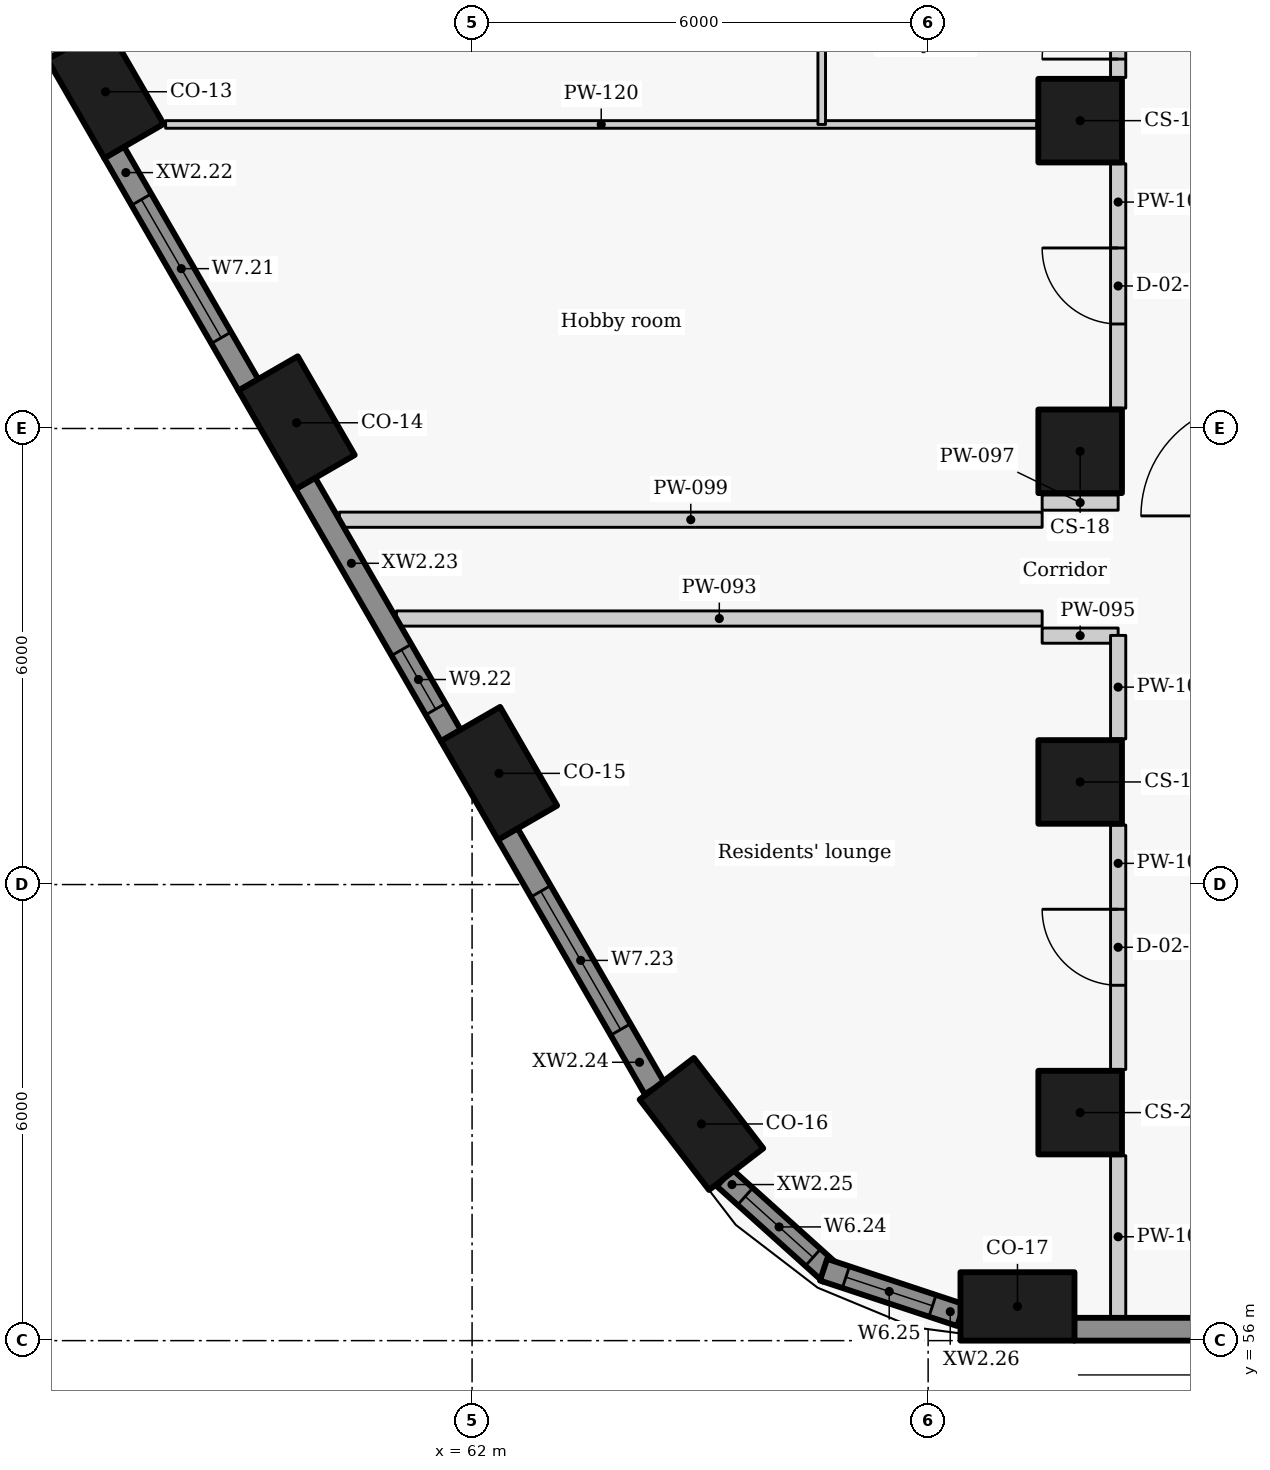
"""IFC4 building model, lengths in metres.
Left out: names, types, materials, properties, quantities, classifications, styles, units other than length and angle.
Written with IfcOpenShell. Run it as: python <this file> out.ifc"""

import sys

from ifc_helpers import new_model, si_unit, direction, frame, frame_2d, origin, origin_2d, place, context, subcontext, project, spatial, rectangle, extrude, element, fill, save


model = new_model("IFC4")
c1 = context("Model", 3, precision=1e-05, world=origin(), true_north=direction((0.0, 1.0)))
c2 = subcontext(c1, "Body", "Model", "MODEL_VIEW")
j1 = project(units=[si_unit("LENGTHUNIT", "METRE"), si_unit("PLANEANGLEUNIT", "RADIAN")], contexts=[c1])
p1 = place(None, origin())
s1 = spatial("IfcSite", under=j1, at=p1, CompositionType="ELEMENT")
p2 = place(p1, origin())
s2 = spatial("IfcBuilding", under=s1, at=p2, CompositionType="ELEMENT")
p3 = place(p2, frame((0.0, 0.0, 41.4)))
s3 = spatial("IfcBuildingStorey", under=s2, at=p3, CompositionType="ELEMENT", Elevation=41.4)
p4 = place(p3, frame((57.177, 72.43, -0.275), z_axis=(0.0, 0.0, 1.0), x_axis=(0.5, -0.866025403784, 0.0)))
e1 = element("IfcColumn", 1, at=p4, inside=s3, PredefinedType="COLUMN", context=c2, shape_type="SweptSolid", body=[
    extrude(rectangle(XDim=1.5, YDim=0.9, at=origin_2d()), origin(), (0.0, 0.0, 1.0), 3.575),
])
for number, where, z_axis, x_axis in (
    (2, (59.692, 68.075, 0.0), (0.0, 0.0, 1.0), (0.5, -0.866, 0.0)),
    (3, (62.354, 63.463, 0.0), (0.0, 0.0, 1.0), (0.5, -0.866, 0.0)),
    (4, (65.018, 58.851, 0.0), (0.0, 0.0, 1.0), (0.609, -0.793, 0.0)),
    (5, (69.175, 56.45, 0.0), (0.0, 0.0, 1.0), (1.0, 0.0, 0.0)),
):
    element("IfcColumn", number, at=place(p3, frame(where, z_axis=z_axis, x_axis=x_axis)), inside=s3, PredefinedType="COLUMN", context=c2, shape_type="SweptSolid", body=[
        extrude(rectangle(XDim=1.5, YDim=0.9, at=origin_2d()), origin(), (0.0, 0.0, 1.0), 3.3),
    ])
for number, where, z_axis, x_axis in (
    (6, (70.0, 72.05, 0.0), (0.0, 0.0, 1.0), (0.0, -1.0, 0.0)),
    (7, (70.0, 67.7, 0.0), (0.0, 0.0, 1.0), (0.0, -1.0, 0.0)),
    (8, (70.0, 63.35, 0.0), (0.0, 0.0, 1.0), (0.0, -1.0, 0.0)),
    (9, (70.0, 59.0, 0.0), (0.0, 0.0, 1.0), (0.0, -1.0, 0.0)),
):
    element("IfcColumn", number, at=place(p3, frame(where, z_axis=z_axis, x_axis=x_axis)), inside=s3, PredefinedType="COLUMN", context=c2, shape_type="SweptSolid", body=[
        extrude(rectangle(XDim=1.1, YDim=1.1, at=origin_2d()), origin(), (0.0, 0.0, 1.0), 3.3),
    ])
p5 = place(p3, frame((53.814, 77.847, 0.0), z_axis=(0.0, 0.0, 1.0), x_axis=(0.492363204642, -0.870389840655, 0.0)))
e10 = element("IfcWall", 10, at=p5, inside=s3, PredefinedType="SOLIDWALL", context=c2, shape_type="SweptSolid", body=[
    extrude(rectangle(XDim=5.626, YDim=0.3, at=frame_2d((2.813, 0.0))), origin(), (0.0, 0.0, 1.0), 2.425),
])
p6 = place(p5, frame((1.081, 0.0, 0.9)))
e11 = element("IfcOpeningElement", 11, at=p6, cuts=e10, PredefinedType="OPENING", context=c2, shape_type="SweptSolid", body=[
    extrude(rectangle(XDim=1.5, YDim=1.1, at=frame_2d((0.75, 0.55))), frame((0.0, 0.16, 0.0), z_axis=(0.0, -1.0, 0.0), x_axis=(1.0, 0.0, 0.0)), (0.0, 0.0, 1.0), 0.32),
])
p7 = place(p5, frame((3.606, 0.0, 0.9)))
e12 = element("IfcOpeningElement", 12, at=p7, cuts=e10, PredefinedType="OPENING", context=c2, shape_type="SweptSolid", body=[
    extrude(rectangle(XDim=1.5, YDim=1.1, at=frame_2d((0.75, 0.55))), frame((0.0, 0.16, 0.0), z_axis=(0.0, -1.0, 0.0), x_axis=(1.0, 0.0, 0.0)), (0.0, 0.0, 1.0), 0.32),
])
p8 = place(p3, frame((57.29, 71.634, 0.0), z_axis=(0.0, 0.0, 1.0), x_axis=(0.499977402622, -0.866038449993, 0.0)))
e13 = element("IfcWall", 13, at=p8, inside=s3, PredefinedType="SOLIDWALL", context=c2, shape_type="SweptSolid", body=[
    extrude(rectangle(XDim=3.537, YDim=0.3, at=frame_2d((1.769, 0.0))), origin(), (0.0, 0.0, 1.0), 2.425),
])
p9 = place(p8, frame((0.719, 0.0, 0.9)))
e14 = element("IfcOpeningElement", 14, at=p9, cuts=e13, PredefinedType="OPENING", context=c2, shape_type="SweptSolid", body=[
    extrude(rectangle(XDim=2.1, YDim=1.1, at=frame_2d((1.05, 0.55))), frame((0.0, 0.16, 0.0), z_axis=(0.0, -1.0, 0.0), x_axis=(1.0, 0.0, 0.0)), (0.0, 0.0, 1.0), 0.32),
])
p10 = place(p3, frame((59.805, 67.279, 0.0), z_axis=(0.0, 0.0, 1.0), x_axis=(0.500001735503, -0.866024401789, 0.0)))
e15 = element("IfcWall", 15, at=p10, inside=s3, PredefinedType="SOLIDWALL", context=c2, shape_type="SweptSolid", body=[
    extrude(rectangle(XDim=3.834, YDim=0.3, at=frame_2d((1.917, 0.0))), origin(), (0.0, 0.0, 1.0), 2.425),
])
p11 = place(p10, frame((2.531, 0.0, 0.9)))
e16 = element("IfcOpeningElement", 16, at=p11, cuts=e15, PredefinedType="OPENING", context=c2, shape_type="SweptSolid", body=[
    extrude(rectangle(XDim=0.9, YDim=1.1, at=frame_2d((0.45, 0.55))), frame((0.0, 0.16, 0.0), z_axis=(0.0, -1.0, 0.0), x_axis=(1.0, 0.0, 0.0)), (0.0, 0.0, 1.0), 0.32),
])
p12 = place(p3, frame((62.468, 62.667, 0.0), z_axis=(0.0, 0.0, 1.0), x_axis=(0.499948341072, -0.866055227026, 0.0)))
e17 = element("IfcWall", 17, at=p12, inside=s3, PredefinedType="SOLIDWALL", context=c2, shape_type="SweptSolid", body=[
    extrude(rectangle(XDim=3.867, YDim=0.3, at=frame_2d((1.934, 0.0))), origin(), (0.0, 0.0, 1.0), 2.425),
])
p13 = place(p12, frame((0.872, 0.0, 0.9)))
e18 = element("IfcOpeningElement", 18, at=p13, cuts=e17, PredefinedType="OPENING", context=c2, shape_type="SweptSolid", body=[
    extrude(rectangle(XDim=2.1, YDim=1.1, at=frame_2d((1.05, 0.55))), frame((0.0, 0.16, 0.0), z_axis=(0.0, -1.0, 0.0), x_axis=(1.0, 0.0, 0.0)), (0.0, 0.0, 1.0), 0.32),
])
p14 = place(p3, frame((65.32, 58.143, 0.0), z_axis=(0.0, 0.0, 1.0), x_axis=(0.7435526378, -0.668677407141, 0.0)))
e19 = element("IfcWall", 19, at=p14, inside=s3, PredefinedType="SOLIDWALL", context=c2, shape_type="SweptSolid", body=[
    extrude(rectangle(XDim=1.878, YDim=0.3, at=frame_2d((0.939, 0.0))), origin(), (0.0, 0.0, 1.0), 2.425),
])
p15 = place(p14, frame((0.367, 0.0, 0.9)))
e20 = element("IfcOpeningElement", 20, at=p15, cuts=e19, PredefinedType="OPENING", context=c2, shape_type="SweptSolid", body=[
    extrude(rectangle(XDim=1.2, YDim=1.1, at=frame_2d((0.6, 0.55))), frame((0.0, 0.16, 0.0), z_axis=(0.0, -1.0, 0.0), x_axis=(1.0, 0.0, 0.0)), (0.0, 0.0, 1.0), 0.32),
])
p16 = place(p3, frame((66.624, 56.933, 0.0), z_axis=(0.0, 0.0, 1.0), x_axis=(0.949246659442, -0.314532636683, 0.0)))
e21 = element("IfcWall", 21, at=p16, inside=s3, PredefinedType="SOLIDWALL", context=c2, shape_type="SweptSolid", body=[
    extrude(rectangle(XDim=1.902, YDim=0.3, at=frame_2d((0.951, 0.0))), origin(), (0.0, 0.0, 1.0), 2.425),
])
p17 = place(p16, frame((0.31, 0.0, 0.9)))
e22 = element("IfcOpeningElement", 22, at=p17, cuts=e21, PredefinedType="OPENING", context=c2, shape_type="SweptSolid", body=[
    extrude(rectangle(XDim=1.2, YDim=1.1, at=frame_2d((0.6, 0.55))), frame((0.0, 0.16, 0.0), z_axis=(0.0, -1.0, 0.0), x_axis=(1.0, 0.0, 0.0)), (0.0, 0.0, 1.0), 0.32),
])
p18 = place(p3, frame((69.921, 56.15, 0.0), z_axis=(0.0, 0.0, 1.0), x_axis=(1.0, 0.0, 0.0)))
e23 = element("IfcWall", 23, at=p18, inside=s3, PredefinedType="SOLIDWALL", context=c2, shape_type="SweptSolid", body=[
    extrude(rectangle(XDim=19.84, YDim=0.3, at=frame_2d((9.92, 0.0))), origin(), (0.0, 0.0, 1.0), 2.425),
])
p19 = place(p3, frame((61.005, 65.5, 0.0), z_axis=(0.0, 0.0, 1.0), x_axis=(1.0, 0.0, 0.0)))
e24 = element("IfcWall", 24, at=p19, inside=s3, PredefinedType="PARTITIONING", context=c2, shape_type="SweptSolid", body=[
    extrude(rectangle(XDim=8.495, YDim=0.2, at=frame_2d((4.248, 0.0))), origin(), (0.0, 0.0, 1.0), 2.405),
])
for number, where, z_axis, x_axis in (
    (25, (69.5, 65.275, 0.0), (0.0, 0.0, 1.0), (1.0, 0.0, 0.0)),
    (26, (69.5, 67.025, 0.0), (0.0, 0.0, 1.0), (1.0, 0.0, 0.0)),
):
    element("IfcWall", number, at=place(p3, frame(where, z_axis=z_axis, x_axis=x_axis)), inside=s3, PredefinedType="PARTITIONING", context=c2, shape_type="SweptSolid", body=[
        extrude(rectangle(XDim=1.0, YDim=0.2, at=frame_2d((0.5, 0.0))), origin(), (0.0, 0.0, 1.0), 2.505),
    ])
p20 = place(p3, frame((60.255, 66.8, 0.0), z_axis=(0.0, 0.0, 1.0), x_axis=(1.0, 0.0, 0.0)))
e27 = element("IfcWall", 27, at=p20, inside=s3, PredefinedType="PARTITIONING", context=c2, shape_type="SweptSolid", body=[
    extrude(rectangle(XDim=9.245, YDim=0.2, at=frame_2d((4.623, 0.0))), origin(), (0.0, 0.0, 1.0), 2.405),
])
p21 = place(p3, frame((70.5, 56.3, 0.0), z_axis=(0.0, 0.0, 1.0), x_axis=(0.0, 1.0, 0.0)))
e28 = element("IfcWall", 28, at=p21, inside=s3, PredefinedType="PARTITIONING", context=c2, shape_type="SweptSolid", body=[
    extrude(rectangle(XDim=2.133, YDim=0.2, at=frame_2d((1.066, 0.0))), origin(), (0.0, 0.0, 1.0), 3.025),
])
p22 = place(p3, frame((70.5, 59.567, 0.0), z_axis=(0.0, 0.0, 1.0), x_axis=(0.0, 1.0, 0.0)))
e29 = element("IfcWall", 29, at=p22, inside=s3, PredefinedType="PARTITIONING", context=c2, shape_type="SweptSolid", body=[
    extrude(rectangle(XDim=3.216, YDim=0.2, at=frame_2d((1.608, 0.0))), origin(), (0.0, 0.0, 1.0), 3.025),
])
p23 = place(p22, frame((1.108, 0.0, 0.0)))
e30 = element("IfcOpeningElement", 30, at=p23, cuts=e29, PredefinedType="OPENING", context=c2, shape_type="SweptSolid", body=[
    extrude(rectangle(XDim=1.0, YDim=2.1, at=frame_2d((0.5, 1.05))), frame((0.0, 0.11, 0.0), z_axis=(0.0, -1.0, 0.0), x_axis=(1.0, 0.0, 0.0)), (0.0, 0.0, 1.0), 0.22),
])
p24 = place(p3, frame((70.5, 63.917, 0.0), z_axis=(0.0, 0.0, 1.0), x_axis=(0.0, 1.0, 0.0)))
e31 = element("IfcWall", 31, at=p24, inside=s3, PredefinedType="PARTITIONING", context=c2, shape_type="SweptSolid", body=[
    extrude(rectangle(XDim=1.361, YDim=0.2, at=frame_2d((0.681, 0.0))), origin(), (0.0, 0.0, 1.0), 3.025),
])
p25 = place(p3, frame((70.5, 68.267, 0.0), z_axis=(0.0, 0.0, 1.0), x_axis=(0.0, 1.0, 0.0)))
e32 = element("IfcWall", 32, at=p25, inside=s3, PredefinedType="PARTITIONING", context=c2, shape_type="SweptSolid", body=[
    extrude(rectangle(XDim=3.216, YDim=0.2, at=frame_2d((1.608, 0.0))), origin(), (0.0, 0.0, 1.0), 3.025),
])
p26 = place(p25, frame((1.108, 0.0, 0.0)))
e33 = element("IfcOpeningElement", 33, at=p26, cuts=e32, PredefinedType="OPENING", context=c2, shape_type="SweptSolid", body=[
    extrude(rectangle(XDim=1.0, YDim=2.1, at=frame_2d((0.5, 1.05))), frame((0.0, 0.11, 0.0), z_axis=(0.0, -1.0, 0.0), x_axis=(1.0, 0.0, 0.0)), (0.0, 0.0, 1.0), 0.22),
])
p27 = place(p3, frame((70.5, 72.617, 0.0), z_axis=(0.0, 0.0, 1.0), x_axis=(0.0, 1.0, 0.0)))
e34 = element("IfcWall", 34, at=p27, inside=s3, PredefinedType="PARTITIONING", context=c2, shape_type="SweptSolid", body=[
    extrude(rectangle(XDim=4.166, YDim=0.2, at=frame_2d((2.083, 0.0))), origin(), (0.0, 0.0, 1.0), 3.025),
])
p28 = place(p27, frame((0.243, 0.0, 0.0)))
e35 = element("IfcOpeningElement", 35, at=p28, cuts=e34, PredefinedType="OPENING", context=c2, shape_type="SweptSolid", body=[
    extrude(rectangle(XDim=1.0, YDim=2.1, at=frame_2d((0.5, 1.05))), frame((0.0, 0.11, 0.0), z_axis=(0.0, -1.0, 0.0), x_axis=(1.0, 0.0, 0.0)), (0.0, 0.0, 1.0), 0.22),
])
p29 = place(p3, frame((57.968, 72.0, 0.0), z_axis=(0.0, 0.0, 1.0), x_axis=(1.0, 0.0, 0.0)))
e36 = element("IfcWall", 36, at=p29, inside=s3, PredefinedType="PARTITIONING", context=c2, shape_type="SweptSolid", body=[
    extrude(rectangle(XDim=11.462, YDim=0.1, at=frame_2d((5.731, 0.0))), origin(), (0.0, 0.0, 1.0), 3.025),
])
p30 = place(p3, frame((66.6, 72.0, 0.0), z_axis=(0.0, 0.0, 1.0), x_axis=(0.0, 1.0, 0.0)))
e37 = element("IfcWall", 37, at=p30, inside=s3, PredefinedType="PARTITIONING", context=c2, shape_type="SweptSolid", body=[
    extrude(rectangle(XDim=21.9, YDim=0.1, at=frame_2d((10.95, 0.0))), origin(), (0.0, 0.0, 1.0), 3.025),
])
p31 = place(p30, frame((1.161, 0.0, 0.0)))
e38 = element("IfcOpeningElement", 38, at=p31, cuts=e37, PredefinedType="OPENING", context=c2, shape_type="SweptSolid", body=[
    extrude(rectangle(XDim=0.9, YDim=2.1, at=frame_2d((0.45, 1.05))), frame((0.0, 0.06, 0.0), z_axis=(0.0, -1.0, 0.0), x_axis=(1.0, 0.0, 0.0)), (0.0, 0.0, 1.0), 0.12),
])
p32 = place(p30, frame((4.384, 0.0, 0.0)))
e39 = element("IfcOpeningElement", 39, at=p32, cuts=e37, PredefinedType="OPENING", context=c2, shape_type="SweptSolid", body=[
    extrude(rectangle(XDim=0.9, YDim=2.1, at=frame_2d((0.45, 1.05))), frame((0.0, 0.06, 0.0), z_axis=(0.0, -1.0, 0.0), x_axis=(1.0, 0.0, 0.0)), (0.0, 0.0, 1.0), 0.12),
])
p33 = place(p30, frame((8.323, 0.0, 0.0)))
e40 = element("IfcOpeningElement", 40, at=p33, cuts=e37, PredefinedType="OPENING", context=c2, shape_type="SweptSolid", body=[
    extrude(rectangle(XDim=0.9, YDim=2.1, at=frame_2d((0.45, 1.05))), frame((0.0, 0.06, 0.0), z_axis=(0.0, -1.0, 0.0), x_axis=(1.0, 0.0, 0.0)), (0.0, 0.0, 1.0), 0.12),
])
p34 = place(p30, frame((12.218, 0.0, 0.0)))
e41 = element("IfcOpeningElement", 41, at=p34, cuts=e37, PredefinedType="OPENING", context=c2, shape_type="SweptSolid", body=[
    extrude(rectangle(XDim=0.9, YDim=2.1, at=frame_2d((0.45, 1.05))), frame((0.0, 0.06, 0.0), z_axis=(0.0, -1.0, 0.0), x_axis=(1.0, 0.0, 0.0)), (0.0, 0.0, 1.0), 0.12),
])
p35 = place(p30, frame((15.353, 0.0, 0.0)))
e42 = element("IfcOpeningElement", 42, at=p35, cuts=e37, PredefinedType="OPENING", context=c2, shape_type="SweptSolid", body=[
    extrude(rectangle(XDim=0.9, YDim=2.1, at=frame_2d((0.45, 1.05))), frame((0.0, 0.06, 0.0), z_axis=(0.0, -1.0, 0.0), x_axis=(1.0, 0.0, 0.0)), (0.0, 0.0, 1.0), 0.12),
])
p36 = place(p30, frame((19.186, 0.0, 0.0)))
e43 = element("IfcOpeningElement", 43, at=p36, cuts=e37, PredefinedType="OPENING", context=c2, shape_type="SweptSolid", body=[
    extrude(rectangle(XDim=0.9, YDim=2.1, at=frame_2d((0.45, 1.05))), frame((0.0, 0.06, 0.0), z_axis=(0.0, -1.0, 0.0), x_axis=(1.0, 0.0, 0.0)), (0.0, 0.0, 1.0), 0.12),
])
p37 = place(p9, origin())
e44 = element("IfcWindow", 44, at=p37, inside=s3, PartitioningType="SINGLE_PANEL", PredefinedType="WINDOW", context=c2, shape_type="SweptSolid", body=[
    extrude(rectangle(XDim=2.1, YDim=1.1, at=frame_2d((1.05, 0.55))), frame((0.0, 0.03, 0.0), z_axis=(0.0, -1.0, 0.0), x_axis=(1.0, 0.0, 0.0)), (0.0, 0.0, 1.0), 0.06),
])
fill(e14, e44)
p38 = place(p11, origin())
e45 = element("IfcWindow", 45, at=p38, inside=s3, PartitioningType="SINGLE_PANEL", PredefinedType="WINDOW", context=c2, shape_type="SweptSolid", body=[
    extrude(rectangle(XDim=0.9, YDim=1.1, at=frame_2d((0.45, 0.55))), frame((0.0, 0.03, 0.0), z_axis=(0.0, -1.0, 0.0), x_axis=(1.0, 0.0, 0.0)), (0.0, 0.0, 1.0), 0.06),
])
fill(e16, e45)
p39 = place(p13, origin())
e46 = element("IfcWindow", 46, at=p39, inside=s3, PartitioningType="SINGLE_PANEL", PredefinedType="WINDOW", context=c2, shape_type="SweptSolid", body=[
    extrude(rectangle(XDim=2.1, YDim=1.1, at=frame_2d((1.05, 0.55))), frame((0.0, 0.03, 0.0), z_axis=(0.0, -1.0, 0.0), x_axis=(1.0, 0.0, 0.0)), (0.0, 0.0, 1.0), 0.06),
])
fill(e18, e46)
p40 = place(p15, origin())
e47 = element("IfcWindow", 47, at=p40, inside=s3, PartitioningType="SINGLE_PANEL", PredefinedType="WINDOW", context=c2, shape_type="SweptSolid", body=[
    extrude(rectangle(XDim=1.2, YDim=1.1, at=frame_2d((0.6, 0.55))), frame((0.0, 0.03, 0.0), z_axis=(0.0, -1.0, 0.0), x_axis=(1.0, 0.0, 0.0)), (0.0, 0.0, 1.0), 0.06),
])
fill(e20, e47)
p41 = place(p17, origin())
e48 = element("IfcWindow", 48, at=p41, inside=s3, PartitioningType="SINGLE_PANEL", PredefinedType="WINDOW", context=c2, shape_type="SweptSolid", body=[
    extrude(rectangle(XDim=1.2, YDim=1.1, at=frame_2d((0.6, 0.55))), frame((0.0, 0.03, 0.0), z_axis=(0.0, -1.0, 0.0), x_axis=(1.0, 0.0, 0.0)), (0.0, 0.0, 1.0), 0.06),
])
fill(e22, e48)
p42 = place(p23, origin())
e49 = element("IfcDoor", 49, at=p42, inside=s3, OperationType="SINGLE_SWING_RIGHT", PredefinedType="DOOR", context=c2, shape_type="SweptSolid", body=[
    extrude(rectangle(XDim=1.0, YDim=2.1, at=frame_2d((0.5, 1.05))), frame((0.0, 0.025, 0.0), z_axis=(0.0, -1.0, 0.0), x_axis=(1.0, 0.0, 0.0)), (0.0, 0.0, 1.0), 0.05),
])
fill(e30, e49)
p43 = place(p28, origin())
e50 = element("IfcDoor", 50, at=p43, inside=s3, OperationType="SINGLE_SWING_LEFT", PredefinedType="DOOR", context=c2, shape_type="SweptSolid", body=[
    extrude(rectangle(XDim=1.0, YDim=2.1, at=frame_2d((0.5, 1.05))), frame((0.0, 0.025, 0.0), z_axis=(0.0, -1.0, 0.0), x_axis=(1.0, 0.0, 0.0)), (0.0, 0.0, 1.0), 0.05),
])
fill(e35, e50)
p44 = place(p26, origin())
e51 = element("IfcDoor", 51, at=p44, inside=s3, OperationType="SINGLE_SWING_RIGHT", PredefinedType="DOOR", context=c2, shape_type="SweptSolid", body=[
    extrude(rectangle(XDim=1.0, YDim=2.1, at=frame_2d((0.5, 1.05))), frame((0.0, 0.025, 0.0), z_axis=(0.0, -1.0, 0.0), x_axis=(1.0, 0.0, 0.0)), (0.0, 0.0, 1.0), 0.05),
])
fill(e33, e51)
save(model, sys.argv[1])
